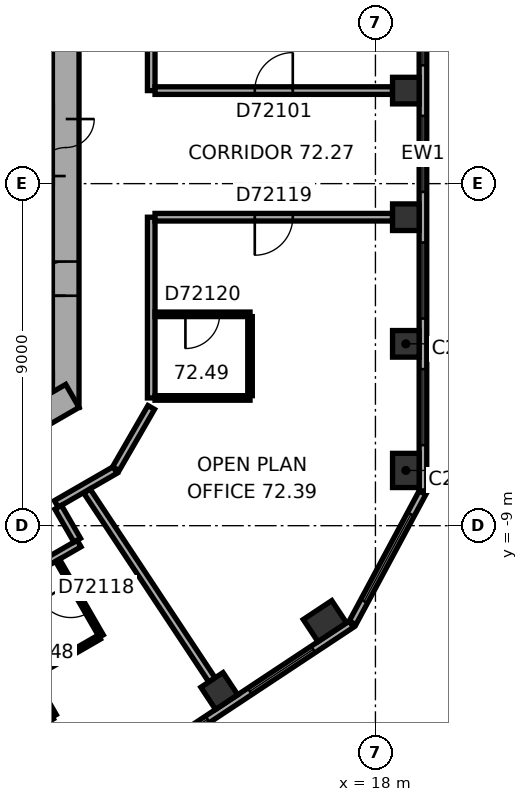
"""IFC4 building model, lengths in metres.
Left out: names, types, materials, properties, quantities, classifications, styles, units other than length and angle.
Written with IfcOpenShell. Run it as: python <this file> out.ifc"""

import sys

from ifc_helpers import new_model, si_unit, direction, frame, frame_2d, origin, origin_2d, place, context, subcontext, project, spatial, rectangle, extrude, element, fill, save


model = new_model("IFC4")
c1 = context("Model", 3, precision=1e-05, world=origin(), true_north=direction((0.0, 1.0)))
c2 = subcontext(c1, "Body", "Model", "MODEL_VIEW")
j1 = project(units=[si_unit("LENGTHUNIT", "METRE"), si_unit("PLANEANGLEUNIT", "RADIAN")], contexts=[c1])
p1 = place(None, origin())
s1 = spatial("IfcSite", under=j1, at=p1, CompositionType="ELEMENT")
p2 = place(p1, origin())
s2 = spatial("IfcBuilding", under=s1, at=p2, CompositionType="ELEMENT")
p3 = place(p2, frame((0.0, 0.0, 293.1)))
s3 = spatial("IfcBuildingStorey", under=s2, at=p3, CompositionType="ELEMENT", Elevation=293.1)
p4 = place(p3, frame((18.8, -7.547, 0.0), z_axis=(0.0, 0.0, 1.0), x_axis=(0.0, 1.0, 0.0)))
e1 = element("IfcColumn", 1, at=p4, inside=s3, PredefinedType="COLUMN", context=c2, shape_type="SweptSolid", body=[
    extrude(rectangle(XDim=0.9, YDim=0.7, at=origin_2d()), origin(), (0.0, 0.0, 1.0), 3.7),
])
for number, where, z_axis, x_axis in (
    (2, (18.8, -4.215, 0.0), (0.0, 0.0, 1.0), (0.0, 1.0, 0.0)),
    (3, (18.8, -0.883, 0.0), (0.0, 0.0, 1.0), (0.0, 1.0, 0.0)),
    (4, (18.8, 2.448, 0.0), (0.0, 0.0, 1.0), (0.0, 1.0, 0.0)),
    (5, (13.891, -13.351, 0.0), (0.0, 0.0, 1.0), (0.834, 0.552, 0.0)),
):
    element("IfcColumn", number, at=place(p3, frame(where, z_axis=z_axis, x_axis=x_axis)), inside=s3, PredefinedType="COLUMN", context=c2, shape_type="SweptSolid", body=[
        extrude(rectangle(XDim=0.7, YDim=0.7, at=origin_2d()), origin(), (0.0, 0.0, 1.0), 3.7),
    ])
p5 = place(p3, frame((16.669, -11.512, 0.0), z_axis=(0.0, 0.0, 1.0), x_axis=(0.833885822067, 0.551936985312, 0.0)))
e6 = element("IfcColumn", 6, at=p5, inside=s3, PredefinedType="COLUMN", context=c2, shape_type="SweptSolid", body=[
    extrude(rectangle(XDim=0.9, YDim=0.7, at=origin_2d()), origin(), (0.0, 0.0, 1.0), 3.7),
])
p6 = place(p3, frame((9.85, -5.889, 0.0), z_axis=(0.0, 0.0, 1.0), x_axis=(0.0, 1.0, 0.0)))
e7 = element("IfcWall", 7, at=p6, inside=s3, PredefinedType="SHEAR", context=c2, shape_type="SweptSolid", body=[
    extrude(rectangle(XDim=11.778, YDim=0.7, at=frame_2d((5.889, 0.0))), origin(), (0.0, 0.0, 1.0), 3.7),
])
p7 = place(p6, frame((6.089, 0.0, 0.0)))
e8 = element("IfcOpeningElement", 8, at=p7, cuts=e7, PredefinedType="OPENING", context=c2, shape_type="SweptSolid", body=[
    extrude(rectangle(XDim=1.5, YDim=2.1, at=frame_2d((0.75, 1.05))), frame((0.0, 0.36, 0.0), z_axis=(0.0, -1.0, 0.0), x_axis=(1.0, 0.0, 0.0)), (0.0, 0.0, 1.0), 0.72),
])
p8 = place(p6, frame((2.939, 0.0, 0.0)))
e9 = element("IfcOpeningElement", 9, at=p8, cuts=e7, PredefinedType="OPENING", context=c2, shape_type="SweptSolid", body=[
    extrude(rectangle(XDim=0.9, YDim=2.1, at=frame_2d((0.45, 1.05))), frame((0.0, 0.36, 0.0), z_axis=(0.0, -1.0, 0.0), x_axis=(1.0, 0.0, 0.0)), (0.0, 0.0, 1.0), 0.72),
])
p9 = place(p3, frame((-0.175, -11.475, 0.0), z_axis=(0.0, 0.0, 1.0), x_axis=(0.866026453023, 0.499998182661, 0.0)))
e10 = element("IfcWall", 10, at=p9, inside=s3, PredefinedType="SHEAR", context=c2, shape_type="SweptSolid", body=[
    extrude(rectangle(XDim=11.778, YDim=0.7, at=frame_2d((5.889, 0.0))), origin(), (0.0, 0.0, 1.0), 3.7),
])
p10 = place(p9, frame((2.439, 0.0, 0.0)))
e11 = element("IfcOpeningElement", 11, at=p10, cuts=e10, PredefinedType="OPENING", context=c2, shape_type="SweptSolid", body=[
    extrude(rectangle(XDim=1.1, YDim=2.1, at=frame_2d((0.55, 1.05))), frame((0.0, 0.36, 0.0), z_axis=(0.0, -1.0, 0.0), x_axis=(1.0, 0.0, 0.0)), (0.0, 0.0, 1.0), 0.72),
])
p11 = place(p9, frame((5.039, 0.0, 0.0)))
e12 = element("IfcOpeningElement", 12, at=p11, cuts=e10, PredefinedType="OPENING", context=c2, shape_type="SweptSolid", body=[
    extrude(rectangle(XDim=1.1, YDim=2.1, at=frame_2d((0.55, 1.05))), frame((0.0, 0.36, 0.0), z_axis=(0.0, -1.0, 0.0), x_axis=(1.0, 0.0, 0.0)), (0.0, 0.0, 1.0), 0.72),
])
p12 = place(p9, frame((7.639, 0.0, 0.0)))
e13 = element("IfcOpeningElement", 13, at=p12, cuts=e10, PredefinedType="OPENING", context=c2, shape_type="SweptSolid", body=[
    extrude(rectangle(XDim=1.1, YDim=2.1, at=frame_2d((0.55, 1.05))), frame((0.0, 0.36, 0.0), z_axis=(0.0, -1.0, 0.0), x_axis=(1.0, 0.0, 0.0)), (0.0, 0.0, 1.0), 0.72),
])
p13 = place(p3, frame((19.25, -8.084, 0.0), z_axis=(0.0, 0.0, 1.0), x_axis=(0.0, 1.0, 0.0)))
e14 = element("IfcWall", 14, at=p13, inside=s3, PredefinedType="STANDARD", context=c2, shape_type="SweptSolid", body=[
    extrude(rectangle(XDim=17.731, YDim=0.2, at=frame_2d((8.866, 0.0))), origin(), (0.0, 0.0, 1.0), 3.7),
])
p14 = place(p13, frame((1.203, 0.0, 0.9)))
e15 = element("IfcOpeningElement", 15, at=p14, cuts=e14, PredefinedType="OPENING", context=c2, shape_type="SweptSolid", body=[
    extrude(rectangle(XDim=2.0, YDim=2.0, at=frame_2d((1.0, 1.0))), frame((0.0, 0.11, 0.0), z_axis=(0.0, -1.0, 0.0), x_axis=(1.0, 0.0, 0.0)), (0.0, 0.0, 1.0), 0.22),
])
p15 = place(p13, frame((4.535, 0.0, 0.9)))
e16 = element("IfcOpeningElement", 16, at=p15, cuts=e14, PredefinedType="OPENING", context=c2, shape_type="SweptSolid", body=[
    extrude(rectangle(XDim=2.0, YDim=2.0, at=frame_2d((1.0, 1.0))), frame((0.0, 0.11, 0.0), z_axis=(0.0, -1.0, 0.0), x_axis=(1.0, 0.0, 0.0)), (0.0, 0.0, 1.0), 0.22),
])
p16 = place(p13, frame((7.866, 0.0, 0.9)))
e17 = element("IfcOpeningElement", 17, at=p16, cuts=e14, PredefinedType="OPENING", context=c2, shape_type="SweptSolid", body=[
    extrude(rectangle(XDim=2.0, YDim=2.0, at=frame_2d((1.0, 1.0))), frame((0.0, 0.11, 0.0), z_axis=(0.0, -1.0, 0.0), x_axis=(1.0, 0.0, 0.0)), (0.0, 0.0, 1.0), 0.22),
])
p17 = place(p13, frame((11.198, 0.0, 0.9)))
e18 = element("IfcOpeningElement", 18, at=p17, cuts=e14, PredefinedType="OPENING", context=c2, shape_type="SweptSolid", body=[
    extrude(rectangle(XDim=2.0, YDim=2.0, at=frame_2d((1.0, 1.0))), frame((0.0, 0.11, 0.0), z_axis=(0.0, -1.0, 0.0), x_axis=(1.0, 0.0, 0.0)), (0.0, 0.0, 1.0), 0.22),
])
p18 = place(p13, frame((14.53, 0.0, 0.9)))
e19 = element("IfcOpeningElement", 19, at=p18, cuts=e14, PredefinedType="OPENING", context=c2, shape_type="SweptSolid", body=[
    extrude(rectangle(XDim=2.0, YDim=2.0, at=frame_2d((1.0, 1.0))), frame((0.0, 0.11, 0.0), z_axis=(0.0, -1.0, 0.0), x_axis=(1.0, 0.0, 0.0)), (0.0, 0.0, 1.0), 0.22),
])
p19 = place(p3, frame((2.58, -21.377, 0.0), z_axis=(0.0, 0.0, 1.0), x_axis=(0.833888592176, 0.551932800112, 0.0)))
e20 = element("IfcWall", 20, at=p19, inside=s3, PredefinedType="STANDARD", context=c2, shape_type="SweptSolid", body=[
    extrude(rectangle(XDim=17.731, YDim=0.2, at=frame_2d((8.866, 0.0))), origin(), (0.0, 0.0, 1.0), 3.7),
])
p20 = place(p19, frame((1.202, 0.0, 0.9)))
e21 = element("IfcOpeningElement", 21, at=p20, cuts=e20, PredefinedType="OPENING", context=c2, shape_type="SweptSolid", body=[
    extrude(rectangle(XDim=2.0, YDim=2.0, at=frame_2d((1.0, 1.0))), frame((0.0, 0.11, 0.0), z_axis=(0.0, -1.0, 0.0), x_axis=(1.0, 0.0, 0.0)), (0.0, 0.0, 1.0), 0.22),
])
p21 = place(p19, frame((4.533, 0.0, 0.9)))
e22 = element("IfcOpeningElement", 22, at=p21, cuts=e20, PredefinedType="OPENING", context=c2, shape_type="SweptSolid", body=[
    extrude(rectangle(XDim=2.0, YDim=2.0, at=frame_2d((1.0, 1.0))), frame((0.0, 0.11, 0.0), z_axis=(0.0, -1.0, 0.0), x_axis=(1.0, 0.0, 0.0)), (0.0, 0.0, 1.0), 0.22),
])
p22 = place(p19, frame((7.865, 0.0, 0.9)))
e23 = element("IfcOpeningElement", 23, at=p22, cuts=e20, PredefinedType="OPENING", context=c2, shape_type="SweptSolid", body=[
    extrude(rectangle(XDim=2.0, YDim=2.0, at=frame_2d((1.0, 1.0))), frame((0.0, 0.11, 0.0), z_axis=(0.0, -1.0, 0.0), x_axis=(1.0, 0.0, 0.0)), (0.0, 0.0, 1.0), 0.22),
])
p23 = place(p19, frame((11.197, 0.0, 0.9)))
e24 = element("IfcOpeningElement", 24, at=p23, cuts=e20, PredefinedType="OPENING", context=c2, shape_type="SweptSolid", body=[
    extrude(rectangle(XDim=2.0, YDim=2.0, at=frame_2d((1.0, 1.0))), frame((0.0, 0.11, 0.0), z_axis=(0.0, -1.0, 0.0), x_axis=(1.0, 0.0, 0.0)), (0.0, 0.0, 1.0), 0.22),
])
p24 = place(p19, frame((14.528, 0.0, 0.9)))
e25 = element("IfcOpeningElement", 25, at=p24, cuts=e20, PredefinedType="OPENING", context=c2, shape_type="SweptSolid", body=[
    extrude(rectangle(XDim=2.0, YDim=2.0, at=frame_2d((1.0, 1.0))), frame((0.0, 0.11, 0.0), z_axis=(0.0, -1.0, 0.0), x_axis=(1.0, 0.0, 0.0)), (0.0, 0.0, 1.0), 0.22),
])
p25 = place(p3, frame((17.399, -11.554, 0.0), z_axis=(0.0, 0.0, 1.0), x_axis=(0.473309051311, 0.880896442238, 0.0)))
e26 = element("IfcWall", 26, at=p25, inside=s3, PredefinedType="STANDARD", context=c2, shape_type="SweptSolid", body=[
    extrude(rectangle(XDim=3.886, YDim=0.2, at=frame_2d((1.943, 0.0))), origin(), (0.0, 0.0, 1.0), 3.7),
])
p26 = place(p25, frame((0.643, 0.0, 0.9)))
e27 = element("IfcOpeningElement", 27, at=p26, cuts=e26, PredefinedType="OPENING", context=c2, shape_type="SweptSolid", body=[
    extrude(rectangle(XDim=2.6, YDim=2.0, at=frame_2d((1.3, 1.0))), frame((0.0, 0.11, 0.0), z_axis=(0.0, -1.0, 0.0), x_axis=(1.0, 0.0, 0.0)), (0.0, 0.0, 1.0), 0.22),
])
for number, where, z_axis, x_axis in (
    (28, (7.3, -5.1, 0.0), (0.0, 0.0, 1.0), (1.0, 0.0, 0.0)),
    (29, (7.3, 0.1, 0.0), (0.0, 0.0, 1.0), (1.0, 0.0, 0.0)),
):
    element("IfcWall", number, at=place(p3, frame(where, z_axis=z_axis, x_axis=x_axis)), inside=s3, PredefinedType="PARTITIONING", context=c2, shape_type="SweptSolid", body=[
        extrude(rectangle(XDim=2.2, YDim=0.2, at=frame_2d((1.1, 0.0))), origin(), (0.0, 0.0, 1.0), 3.42),
    ])
p27 = place(p3, frame((7.3, 1.9, 0.0), z_axis=(0.0, 0.0, 1.0), x_axis=(1.0, 0.0, 0.0)))
e30 = element("IfcWall", 30, at=p27, inside=s3, PredefinedType="SHEAR", context=c2, shape_type="SweptSolid", body=[
    extrude(rectangle(XDim=2.2, YDim=0.3, at=frame_2d((1.1, 0.0))), origin(), (0.0, 0.0, 1.0), 3.42),
])
p28 = place(p27, frame((0.7, 0.0, 0.0)))
e31 = element("IfcOpeningElement", 31, at=p28, cuts=e30, PredefinedType="OPENING", context=c2, shape_type="SweptSolid", body=[
    extrude(rectangle(XDim=1.1, YDim=2.1, at=frame_2d((0.55, 1.05))), frame((0.0, 0.16, 0.0), z_axis=(0.0, -1.0, 0.0), x_axis=(1.0, 0.0, 0.0)), (0.0, 0.0, 1.0), 0.32),
])
p29 = place(p3, frame((7.8, -10.971, 0.0), z_axis=(0.0, 0.0, 1.0), x_axis=(0.500010275428, -0.866019471182, 0.0)))
e32 = element("IfcWall", 32, at=p29, inside=s3, PredefinedType="PARTITIONING", context=c2, shape_type="SweptSolid", body=[
    extrude(rectangle(XDim=3.5, YDim=0.12, at=frame_2d((1.75, 0.0))), origin(), (0.0, 0.0, 1.0), 3.42),
])
p30 = place(p3, frame((7.854, -10.824, 0.0), z_axis=(0.0, 0.0, 1.0), x_axis=(0.866029675718, 0.499992600721, 0.0)))
e33 = element("IfcWall", 33, at=p30, inside=s3, PredefinedType="PARTITIONING", context=c2, shape_type="SweptSolid", body=[
    extrude(rectangle(XDim=2.712, YDim=0.2, at=frame_2d((1.356, 0.0))), origin(), (0.0, 0.0, 1.0), 3.42),
])
p31 = place(p3, frame((9.498, -14.032, 0.0), z_axis=(0.0, 0.0, 1.0), x_axis=(-0.866040564224, -0.499973740429, 0.0)))
e34 = element("IfcWall", 34, at=p31, inside=s3, PredefinedType="PARTITIONING", context=c2, shape_type="SweptSolid", body=[
    extrude(rectangle(XDim=3.28, YDim=0.12, at=frame_2d((1.64, 0.0))), origin(), (0.0, 0.0, 1.0), 3.42),
])
p32 = place(p31, frame((1.19, 0.0, 0.0)))
e35 = element("IfcOpeningElement", 35, at=p32, cuts=e34, PredefinedType="OPENING", context=c2, shape_type="SweptSolid", body=[
    extrude(rectangle(XDim=0.9, YDim=2.1, at=frame_2d((0.45, 1.05))), frame((0.0, 0.07, 0.0), z_axis=(0.0, -1.0, 0.0), x_axis=(1.0, 0.0, 0.0)), (0.0, 0.0, 1.0), 0.14),
])
p33 = place(p3, frame((9.602, -8.428, 0.0), z_axis=(0.0, 0.0, 1.0), x_axis=(0.865999114786, 0.500045531117, 0.0)))
e36 = element("IfcWall", 36, at=p33, inside=s3, PredefinedType="PARTITIONING", context=c2, shape_type="SweptSolid", body=[
    extrude(rectangle(XDim=1.788, YDim=0.2, at=frame_2d((0.894, 0.0))), origin(), (0.0, 0.0, 1.0), 3.42),
])
p34 = place(p3, frame((9.635, -9.911, 0.0), z_axis=(0.0, 0.0, 1.0), x_axis=(0.499952165731, -0.866053019151, 0.0)))
e37 = element("IfcWall", 37, at=p34, inside=s3, PredefinedType="PARTITIONING", context=c2, shape_type="SweptSolid", body=[
    extrude(rectangle(XDim=2.3, YDim=0.12, at=frame_2d((1.15, 0.0))), origin(), (0.0, 0.0, 1.0), 3.42),
])
p35 = place(p34, frame((0.7, 0.0, 0.0)))
e38 = element("IfcOpeningElement", 38, at=p35, cuts=e37, PredefinedType="OPENING", context=c2, shape_type="SweptSolid", body=[
    extrude(rectangle(XDim=0.9, YDim=2.1, at=frame_2d((0.45, 1.05))), frame((0.0, 0.07, 0.0), z_axis=(0.0, -1.0, 0.0), x_axis=(1.0, 0.0, 0.0)), (0.0, 0.0, 1.0), 0.14),
])
p36 = place(p3, frame((10.152, -9.382, 0.0), z_axis=(0.0, 0.0, 1.0), x_axis=(-0.499968756647, 0.866043441391, 0.0)))
e39 = element("IfcWall", 39, at=p36, inside=s3, PredefinedType="PARTITIONING", context=c2, shape_type="SweptSolid", body=[
    extrude(rectangle(XDim=1.001, YDim=0.2, at=frame_2d((0.5, 0.0))), origin(), (0.0, 0.0, 1.0), 3.42),
])
p37 = place(p3, frame((10.733, -11.933, 0.0), z_axis=(0.0, 0.0, 1.0), x_axis=(-0.866012558475, -0.500022248069, 0.0)))
e40 = element("IfcWall", 40, at=p37, inside=s3, PredefinedType="PARTITIONING", context=c2, shape_type="SweptSolid", body=[
    extrude(rectangle(XDim=1.88, YDim=0.12, at=frame_2d((0.94, 0.0))), origin(), (0.0, 0.0, 1.0), 3.42),
])
p38 = place(p3, frame((11.17, -7.5, 0.0), z_axis=(0.0, 0.0, 1.0), x_axis=(0.500006454166, 0.866021677438, 0.0)))
e41 = element("IfcWall", 41, at=p38, inside=s3, PredefinedType="PARTITIONING", context=c2, shape_type="SweptSolid", body=[
    extrude(rectangle(XDim=1.86, YDim=0.2, at=frame_2d((0.93, 0.0))), origin(), (0.0, 0.0, 1.0), 3.42),
])
p39 = place(p3, frame((12.1, -5.639, 0.0), z_axis=(0.0, 0.0, 1.0), x_axis=(0.0, 1.0, 0.0)))
e42 = element("IfcWall", 42, at=p39, inside=s3, PredefinedType="PARTITIONING", context=c2, shape_type="SweptSolid", body=[
    extrude(rectangle(XDim=4.756, YDim=0.2, at=frame_2d((2.378, 0.0))), origin(), (0.0, 0.0, 1.0), 3.42),
])
p40 = place(p3, frame((12.1, 2.448, 0.0), z_axis=(0.0, 0.0, 1.0), x_axis=(0.0, 1.0, 0.0)))
e43 = element("IfcWall", 43, at=p40, inside=s3, PredefinedType="PARTITIONING", context=c2, shape_type="SweptSolid", body=[
    extrude(rectangle(XDim=3.332, YDim=0.2, at=frame_2d((1.666, 0.0))), origin(), (0.0, 0.0, 1.0), 3.42),
])
p41 = place(p3, frame((12.2, -3.439, 0.0), z_axis=(0.0, 0.0, 1.0), x_axis=(1.0, 0.0, 0.0)))
e44 = element("IfcWall", 44, at=p41, inside=s3, PredefinedType="PARTITIONING", context=c2, shape_type="SweptSolid", body=[
    extrude(rectangle(XDim=2.5, YDim=0.12, at=frame_2d((1.25, 0.0))), origin(), (0.0, 0.0, 1.0), 3.42),
])
p42 = place(p41, frame((0.8, 0.0, 0.0)))
e45 = element("IfcOpeningElement", 45, at=p42, cuts=e44, PredefinedType="OPENING", context=c2, shape_type="SweptSolid", body=[
    extrude(rectangle(XDim=0.9, YDim=2.1, at=frame_2d((0.45, 1.05))), frame((0.0, 0.07, 0.0), z_axis=(0.0, -1.0, 0.0), x_axis=(1.0, 0.0, 0.0)), (0.0, 0.0, 1.0), 0.14),
])
p43 = place(p3, frame((12.2, -0.883, 0.0), z_axis=(0.0, 0.0, 1.0), x_axis=(1.0, 0.0, 0.0)))
e46 = element("IfcWall", 46, at=p43, inside=s3, PredefinedType="PARTITIONING", context=c2, shape_type="SweptSolid", body=[
    extrude(rectangle(XDim=6.25, YDim=0.2, at=frame_2d((3.125, 0.0))), origin(), (0.0, 0.0, 1.0), 2.87),
])
p44 = place(p43, frame((2.625, 0.0, 0.0)))
e47 = element("IfcOpeningElement", 47, at=p44, cuts=e46, PredefinedType="OPENING", context=c2, shape_type="SweptSolid", body=[
    extrude(rectangle(XDim=1.0, YDim=2.1, at=frame_2d((0.5, 1.05))), frame((0.0, 0.11, 0.0), z_axis=(0.0, -1.0, 0.0), x_axis=(1.0, 0.0, 0.0)), (0.0, 0.0, 1.0), 0.22),
])
p45 = place(p3, frame((13.698, -13.059, 0.0), z_axis=(0.0, 0.0, 1.0), x_axis=(-0.551927229301, 0.833892279348, 0.0)))
e48 = element("IfcWall", 48, at=p45, inside=s3, PredefinedType="PARTITIONING", context=c2, shape_type="SweptSolid", body=[
    extrude(rectangle(XDim=5.96, YDim=0.2, at=frame_2d((2.98, 0.0))), origin(), (0.0, 0.0, 1.0), 2.87),
])
p46 = place(p3, frame((14.7, -5.639, 0.0), z_axis=(0.0, 0.0, 1.0), x_axis=(-1.0, 0.0, 0.0)))
e49 = element("IfcWall", 49, at=p46, inside=s3, PredefinedType="PARTITIONING", context=c2, shape_type="SweptSolid", body=[
    extrude(rectangle(XDim=2.5, YDim=0.12, at=frame_2d((1.25, 0.0))), origin(), (0.0, 0.0, 1.0), 3.42),
])
p47 = place(p3, frame((14.7, -3.499, 0.0), z_axis=(0.0, 0.0, 1.0), x_axis=(0.0, -1.0, 0.0)))
e50 = element("IfcWall", 50, at=p47, inside=s3, PredefinedType="PARTITIONING", context=c2, shape_type="SweptSolid", body=[
    extrude(rectangle(XDim=2.08, YDim=0.12, at=frame_2d((1.04, 0.0))), origin(), (0.0, 0.0, 1.0), 3.42),
])
p48 = place(p3, frame((18.45, 2.448, 0.0), z_axis=(0.0, 0.0, 1.0), x_axis=(-1.0, 0.0, 0.0)))
e51 = element("IfcWall", 51, at=p48, inside=s3, PredefinedType="PARTITIONING", context=c2, shape_type="SweptSolid", body=[
    extrude(rectangle(XDim=6.25, YDim=0.2, at=frame_2d((3.125, 0.0))), origin(), (0.0, 0.0, 1.0), 3.42),
])
p49 = place(p48, frame((2.625, 0.0, 0.0)))
e52 = element("IfcOpeningElement", 52, at=p49, cuts=e51, PredefinedType="OPENING", context=c2, shape_type="SweptSolid", body=[
    extrude(rectangle(XDim=1.0, YDim=2.1, at=frame_2d((0.5, 1.05))), frame((0.0, 0.11, 0.0), z_axis=(0.0, -1.0, 0.0), x_axis=(1.0, 0.0, 0.0)), (0.0, 0.0, 1.0), 0.22),
])
p50 = place(p14, origin())
e53 = element("IfcWindow", 53, at=p50, inside=s3, PartitioningType="SINGLE_PANEL", PredefinedType="WINDOW", context=c2, shape_type="SweptSolid", body=[
    extrude(rectangle(XDim=2.0, YDim=2.0, at=frame_2d((1.0, 1.0))), frame((0.0, 0.03, 0.0), z_axis=(0.0, -1.0, 0.0), x_axis=(1.0, 0.0, 0.0)), (0.0, 0.0, 1.0), 0.06),
])
fill(e15, e53)
p51 = place(p15, origin())
e54 = element("IfcWindow", 54, at=p51, inside=s3, PartitioningType="SINGLE_PANEL", PredefinedType="WINDOW", context=c2, shape_type="SweptSolid", body=[
    extrude(rectangle(XDim=2.0, YDim=2.0, at=frame_2d((1.0, 1.0))), frame((0.0, 0.03, 0.0), z_axis=(0.0, -1.0, 0.0), x_axis=(1.0, 0.0, 0.0)), (0.0, 0.0, 1.0), 0.06),
])
fill(e16, e54)
p52 = place(p16, origin())
e55 = element("IfcWindow", 55, at=p52, inside=s3, PartitioningType="SINGLE_PANEL", PredefinedType="WINDOW", context=c2, shape_type="SweptSolid", body=[
    extrude(rectangle(XDim=2.0, YDim=2.0, at=frame_2d((1.0, 1.0))), frame((0.0, 0.03, 0.0), z_axis=(0.0, -1.0, 0.0), x_axis=(1.0, 0.0, 0.0)), (0.0, 0.0, 1.0), 0.06),
])
fill(e17, e55)
p53 = place(p17, origin())
e56 = element("IfcWindow", 56, at=p53, inside=s3, PartitioningType="SINGLE_PANEL", PredefinedType="WINDOW", context=c2, shape_type="SweptSolid", body=[
    extrude(rectangle(XDim=2.0, YDim=2.0, at=frame_2d((1.0, 1.0))), frame((0.0, 0.03, 0.0), z_axis=(0.0, -1.0, 0.0), x_axis=(1.0, 0.0, 0.0)), (0.0, 0.0, 1.0), 0.06),
])
fill(e18, e56)
p54 = place(p23, origin())
e57 = element("IfcWindow", 57, at=p54, inside=s3, PartitioningType="SINGLE_PANEL", PredefinedType="WINDOW", context=c2, shape_type="SweptSolid", body=[
    extrude(rectangle(XDim=2.0, YDim=2.0, at=frame_2d((1.0, 1.0))), frame((0.0, 0.03, 0.0), z_axis=(0.0, -1.0, 0.0), x_axis=(1.0, 0.0, 0.0)), (0.0, 0.0, 1.0), 0.06),
])
fill(e24, e57)
p55 = place(p24, origin())
e58 = element("IfcWindow", 58, at=p55, inside=s3, PartitioningType="SINGLE_PANEL", PredefinedType="WINDOW", context=c2, shape_type="SweptSolid", body=[
    extrude(rectangle(XDim=2.0, YDim=2.0, at=frame_2d((1.0, 1.0))), frame((0.0, 0.03, 0.0), z_axis=(0.0, -1.0, 0.0), x_axis=(1.0, 0.0, 0.0)), (0.0, 0.0, 1.0), 0.06),
])
fill(e25, e58)
p56 = place(p26, origin())
e59 = element("IfcWindow", 59, at=p56, inside=s3, PartitioningType="SINGLE_PANEL", PredefinedType="WINDOW", context=c2, shape_type="SweptSolid", body=[
    extrude(rectangle(XDim=2.6, YDim=2.0, at=frame_2d((1.3, 1.0))), frame((0.0, 0.03, 0.0), z_axis=(0.0, -1.0, 0.0), x_axis=(1.0, 0.0, 0.0)), (0.0, 0.0, 1.0), 0.06),
])
fill(e27, e59)
p57 = place(p7, origin())
e60 = element("IfcDoor", 60, at=p57, inside=s3, OperationType="DOUBLE_DOOR_SINGLE_SWING", PredefinedType="DOOR", context=c2, shape_type="SweptSolid", body=[
    extrude(rectangle(XDim=1.5, YDim=2.1, at=frame_2d((0.75, 1.05))), frame((0.0, 0.025, 0.0), z_axis=(0.0, -1.0, 0.0), x_axis=(1.0, 0.0, 0.0)), (0.0, 0.0, 1.0), 0.05),
])
fill(e8, e60)
p58 = place(p8, origin())
e61 = element("IfcDoor", 61, at=p58, inside=s3, OperationType="SINGLE_SWING_LEFT", PredefinedType="DOOR", context=c2, shape_type="SweptSolid", body=[
    extrude(rectangle(XDim=0.9, YDim=2.1, at=frame_2d((0.45, 1.05))), frame((0.0, 0.025, 0.0), z_axis=(0.0, -1.0, 0.0), x_axis=(1.0, 0.0, 0.0)), (0.0, 0.0, 1.0), 0.05),
])
fill(e9, e61)
p59 = place(p49, origin())
e62 = element("IfcDoor", 62, at=p59, inside=s3, OperationType="SINGLE_SWING_LEFT", PredefinedType="DOOR", context=c2, shape_type="SweptSolid", body=[
    extrude(rectangle(XDim=1.0, YDim=2.1, at=frame_2d((0.5, 1.05))), frame((0.0, 0.025, 0.0), z_axis=(0.0, -1.0, 0.0), x_axis=(1.0, 0.0, 0.0)), (0.0, 0.0, 1.0), 0.05),
])
fill(e52, e62)
p60 = place(p35, origin())
e63 = element("IfcDoor", 63, at=p60, inside=s3, OperationType="SINGLE_SWING_LEFT", PredefinedType="DOOR", context=c2, shape_type="SweptSolid", body=[
    extrude(rectangle(XDim=0.9, YDim=2.1, at=frame_2d((0.45, 1.05))), frame((0.0, 0.025, 0.0), z_axis=(0.0, -1.0, 0.0), x_axis=(1.0, 0.0, 0.0)), (0.0, 0.0, 1.0), 0.05),
])
fill(e38, e63)
p61 = place(p44, origin())
e64 = element("IfcDoor", 64, at=p61, inside=s3, OperationType="SINGLE_SWING_LEFT", PredefinedType="DOOR", context=c2, shape_type="SweptSolid", body=[
    extrude(rectangle(XDim=1.0, YDim=2.1, at=frame_2d((0.5, 1.05))), frame((0.0, 0.025, 0.0), z_axis=(0.0, -1.0, 0.0), x_axis=(1.0, 0.0, 0.0)), (0.0, 0.0, 1.0), 0.05),
])
fill(e47, e64)
p62 = place(p42, origin())
e65 = element("IfcDoor", 65, at=p62, inside=s3, OperationType="SINGLE_SWING_LEFT", PredefinedType="DOOR", context=c2, shape_type="SweptSolid", body=[
    extrude(rectangle(XDim=0.9, YDim=2.1, at=frame_2d((0.45, 1.05))), frame((0.0, 0.025, 0.0), z_axis=(0.0, -1.0, 0.0), x_axis=(1.0, 0.0, 0.0)), (0.0, 0.0, 1.0), 0.05),
])
fill(e45, e65)
save(model, sys.argv[1])
